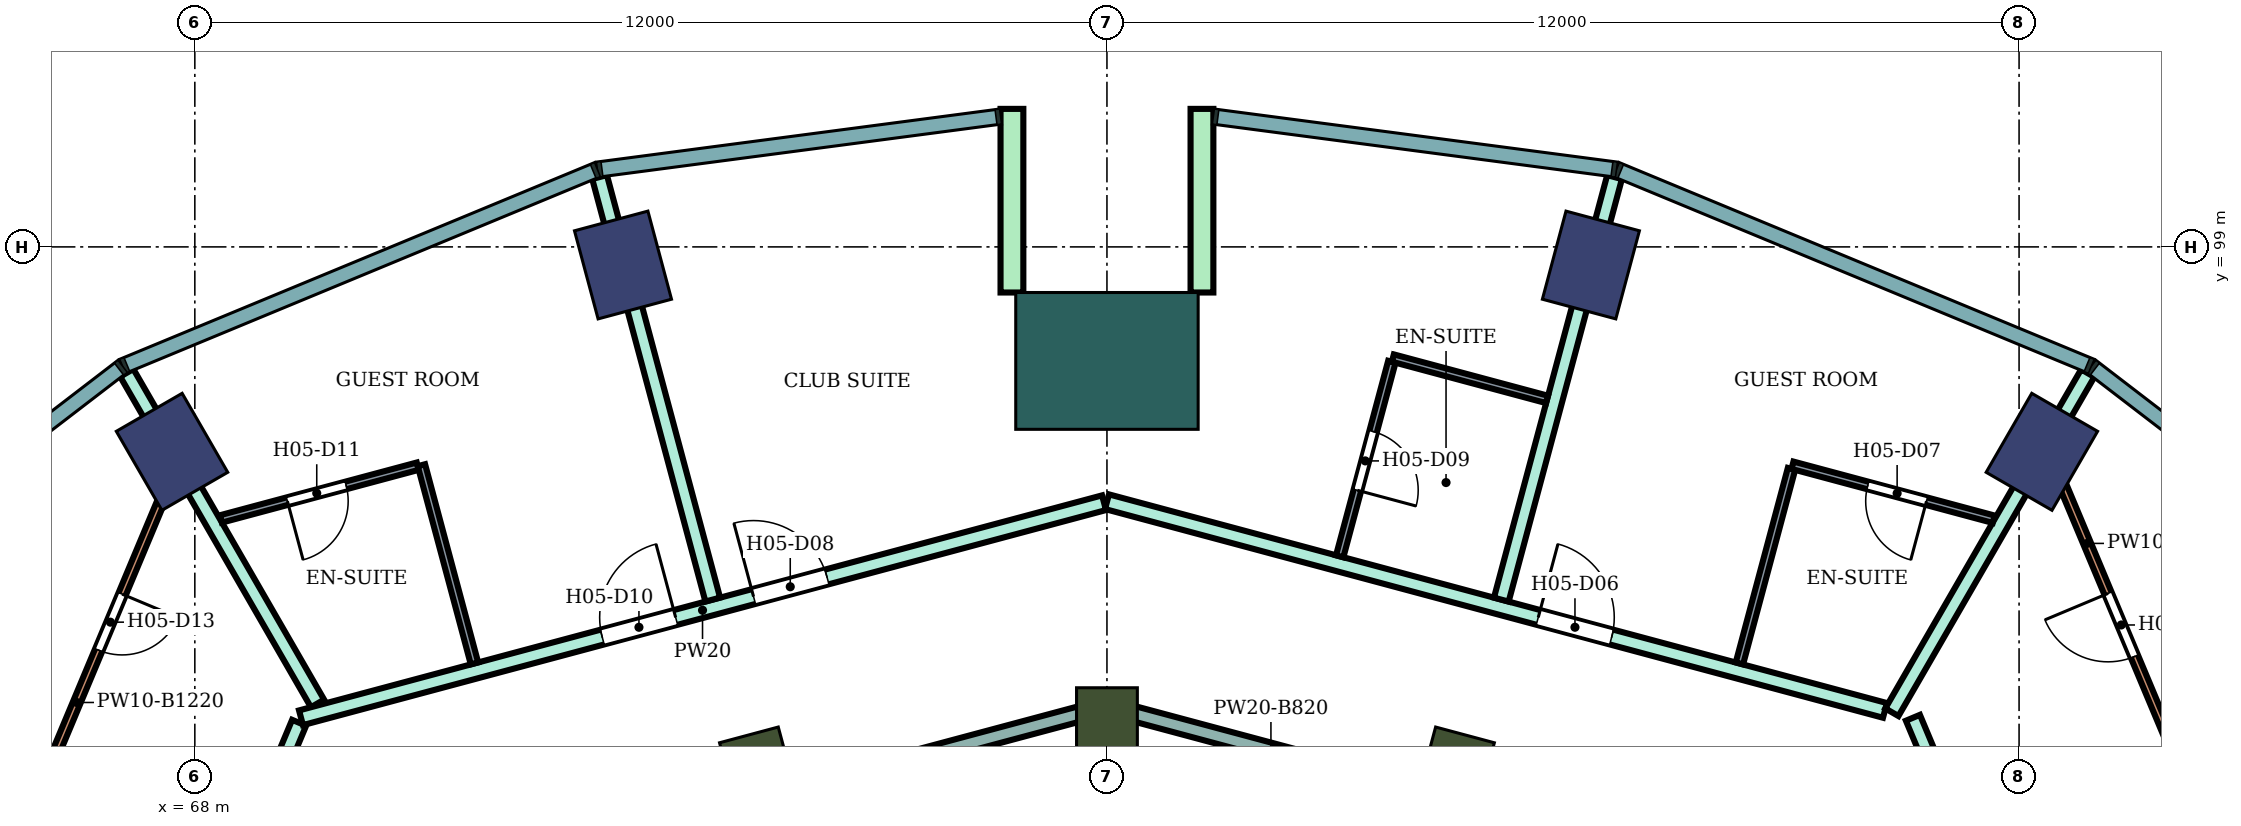
"""IFC4 building model, lengths in metres.
Left out: names, types, materials, properties, quantities, classifications, styles, units other than length and angle.
Written with IfcOpenShell. Run it as: python <this file> out.ifc"""

import sys

from ifc_helpers import new_model, si_unit, direction, frame, frame_2d, origin, origin_2d, place, context, subcontext, project, spatial, rectangle, extrude, element, fill, save


model = new_model("IFC4")
c1 = context("Model", 3, precision=1e-05, world=origin(), true_north=direction((0.0, 1.0)))
c2 = subcontext(c1, "Body", "Model", "MODEL_VIEW")
j1 = project(units=[si_unit("LENGTHUNIT", "METRE"), si_unit("PLANEANGLEUNIT", "RADIAN")], contexts=[c1])
p1 = place(None, origin())
s1 = spatial("IfcSite", under=j1, at=p1, CompositionType="ELEMENT")
p2 = place(p1, origin())
s2 = spatial("IfcBuilding", under=s1, at=p2, CompositionType="ELEMENT")
p3 = place(p2, frame((0.0, 0.0, 90.0)))
s3 = spatial("IfcBuildingStorey", under=s2, at=p3, CompositionType="ELEMENT", Elevation=90.0)
for number, where, z_axis, x_axis in (
    (1, (92.3, 96.304, 0.0), (0.0, 0.0, 1.0), (0.5, 0.866, 0.0)),
    (2, (86.367, 98.762, 0.0), (0.0, 0.0, 1.0), (0.259, 0.966, 0.0)),
    (3, (73.633, 98.762, 0.0), (0.0, 0.0, 1.0), (-0.259, 0.966, 0.0)),
    (4, (67.7, 96.304, 0.0), (0.0, 0.0, 1.0), (-0.5, 0.866, 0.0)),
):
    element("IfcColumn", number, at=place(p3, frame(where, z_axis=z_axis, x_axis=x_axis)), inside=s3, PredefinedType="COLUMN", context=c2, shape_type="SweptSolid", body=[
        extrude(rectangle(XDim=1.2, YDim=1.0, at=origin_2d()), origin(), (0.0, 0.0, 1.0), 3.8),
    ])
for number, where, z_axis, x_axis in (
    (5, (84.555, 92.0, 0.0), (0.0, 0.0, 1.0), (0.259, 0.966, 0.0)),
    (6, (80.0, 92.6, 0.0), (0.0, 0.0, 1.0), (0.0, 1.0, 0.0)),
    (7, (75.445, 92.0, 0.0), (0.0, 0.0, 1.0), (-0.259, 0.966, 0.0)),
):
    element("IfcColumn", number, at=place(p3, frame(where, z_axis=z_axis, x_axis=x_axis)), inside=s3, PredefinedType="COLUMN", context=c2, shape_type="SweptSolid", body=[
        extrude(rectangle(XDim=1.2, YDim=0.8, at=origin_2d()), origin(), (0.0, 0.0, 1.0), 3.8),
    ])
p4 = place(p3, frame((80.0, 97.5, 0.0), z_axis=(0.0, 0.0, 1.0), x_axis=(0.0, 1.0, 0.0)))
e8 = element("IfcColumn", 8, at=p4, inside=s3, PredefinedType="COLUMN", context=c2, shape_type="SweptSolid", body=[
    extrude(rectangle(XDim=1.8, YDim=2.4, at=origin_2d()), origin(), (0.0, 0.0, 1.0), 3.8),
])
for number, where, z_axis, x_axis in (
    (9, (81.25, 98.4, 0.0), (0.0, 0.0, 1.0), (0.0, 1.0, 0.0)),
    (10, (78.75, 98.4, 0.0), (0.0, 0.0, 1.0), (0.0, 1.0, 0.0)),
):
    element("IfcWall", number, at=place(p3, frame(where, z_axis=z_axis, x_axis=x_axis)), inside=s3, PredefinedType="NOTDEFINED", context=c2, shape_type="SweptSolid", body=[
        extrude(rectangle(XDim=2.416, YDim=0.3, at=frame_2d((1.208, 0.0))), origin(), (0.0, 0.0, 1.0), 3.8),
    ])
p5 = place(p3, frame((66.085, 84.9, 0.0), z_axis=(0.0, 0.0, 1.0), x_axis=(0.386676248006, 0.922215527536, 0.0)))
e11 = element("IfcWall", 11, at=p5, inside=s3, PredefinedType="PARTITIONING", context=c2, shape_type="SweptSolid", body=[
    extrude(rectangle(XDim=8.5, YDim=0.2, at=frame_2d((4.25, 0.0))), origin(), (0.0, 0.0, 1.0), 3.35),
])
p6 = place(p5, frame((3.748, 0.0, 0.0)))
e12 = element("IfcOpeningElement", 12, at=p6, cuts=e11, PredefinedType="OPENING", context=c2, shape_type="SweptSolid", body=[
    extrude(rectangle(XDim=1.0, YDim=2.1, at=frame_2d((0.5, 1.05))), frame((0.0, 0.11, 0.0), z_axis=(0.0, -1.0, 0.0), x_axis=(1.0, 0.0, 0.0)), (0.0, 0.0, 1.0), 0.22),
])
p7 = place(p3, frame((67.104, 97.343, 0.0), z_axis=(0.0, 0.0, 1.0), x_axis=(0.499799615385, -0.866141064989, 0.0)))
e13 = element("IfcWall", 13, at=p7, inside=s3, PredefinedType="PARTITIONING", context=c2, shape_type="SweptSolid", body=[
    extrude(rectangle(XDim=5.021, YDim=0.2, at=frame_2d((2.511, 0.0))), origin(), (0.0, 0.0, 1.0), 3.35),
])
p8 = place(p3, frame((69.397, 92.805, 0.0), z_axis=(0.0, 0.0, 1.0), x_axis=(0.96596468683, 0.258673972015, 0.0)))
e14 = element("IfcWall", 14, at=p8, inside=s3, PredefinedType="PARTITIONING", context=c2, shape_type="SweptSolid", body=[
    extrude(rectangle(XDim=10.937, YDim=0.2, at=frame_2d((5.469, 0.0))), origin(), (0.0, 0.0, 1.0), 3.35),
])
p9 = place(p8, frame((6.163, 0.0, 0.0)))
e15 = element("IfcOpeningElement", 15, at=p9, cuts=e14, PredefinedType="OPENING", context=c2, shape_type="SweptSolid", body=[
    extrude(rectangle(XDim=1.0, YDim=2.1, at=frame_2d((0.5, 1.05))), frame((0.0, 0.11, 0.0), z_axis=(0.0, -1.0, 0.0), x_axis=(1.0, 0.0, 0.0)), (0.0, 0.0, 1.0), 0.22),
])
p10 = place(p8, frame((4.103, 0.0, 0.0)))
e16 = element("IfcOpeningElement", 16, at=p10, cuts=e14, PredefinedType="OPENING", context=c2, shape_type="SweptSolid", body=[
    extrude(rectangle(XDim=1.0, YDim=2.1, at=frame_2d((0.5, 1.05))), frame((0.0, 0.11, 0.0), z_axis=(0.0, -1.0, 0.0), x_axis=(1.0, 0.0, 0.0)), (0.0, 0.0, 1.0), 0.22),
])
p11 = place(p3, frame((71.303, 90.625, 0.0), z_axis=(0.0, 0.0, 1.0), x_axis=(0.965971868307, 0.258647152776, 0.0)))
e17 = element("IfcWall", 17, at=p11, inside=s3, PredefinedType="PARTITIONING", context=c2, shape_type="SweptSolid", body=[
    extrude(rectangle(XDim=8.874, YDim=0.2, at=frame_2d((4.437, 0.0))), origin(), (0.0, 0.0, 1.0), 2.98),
])
p12 = place(p11, frame((0.55, 0.0, 0.0)))
e18 = element("IfcOpeningElement", 18, at=p12, cuts=e17, PredefinedType="OPENING", context=c2, shape_type="SweptSolid", body=[
    extrude(rectangle(XDim=1.0, YDim=2.1, at=frame_2d((0.5, 1.05))), frame((0.0, 0.11, 0.0), z_axis=(0.0, -1.0, 0.0), x_axis=(1.0, 0.0, 0.0)), (0.0, 0.0, 1.0), 0.22),
])
p13 = place(p3, frame((73.325, 99.919, 0.0), z_axis=(0.0, 0.0, 1.0), x_axis=(0.25871346471, -0.965954110286, 0.0)))
e19 = element("IfcWall", 19, at=p13, inside=s3, PredefinedType="PARTITIONING", context=c2, shape_type="SweptSolid", body=[
    extrude(rectangle(XDim=5.754, YDim=0.2, at=frame_2d((2.877, 0.0))), origin(), (0.0, 0.0, 1.0), 3.35),
])
p14 = place(p3, frame((80.0, 82.699, 0.0), z_axis=(0.0, 0.0, 1.0), x_axis=(0.0, 1.0, 0.0)))
e20 = element("IfcWall", 20, at=p14, inside=s3, PredefinedType="PARTITIONING", context=c2, shape_type="SweptSolid", body=[
    extrude(rectangle(XDim=10.125, YDim=0.2, at=frame_2d((5.062, 0.0))), origin(), (0.0, 0.0, 1.0), 3.35),
])
p15 = place(p3, frame((80.0, 92.954, 0.0), z_axis=(0.0, 0.0, 1.0), x_axis=(0.965932194462, -0.258795277586, 0.0)))
e21 = element("IfcWall", 21, at=p15, inside=s3, PredefinedType="PARTITIONING", context=c2, shape_type="SweptSolid", body=[
    extrude(rectangle(XDim=8.934, YDim=0.2, at=frame_2d((4.467, 0.0))), origin(), (0.0, 0.0, 1.0), 2.98),
])
p16 = place(p15, frame((3.302, 0.0, 0.0)))
e22 = element("IfcOpeningElement", 22, at=p16, cuts=e21, PredefinedType="OPENING", context=c2, shape_type="SweptSolid", body=[
    extrude(rectangle(XDim=0.9, YDim=2.1, at=frame_2d((0.45, 1.05))), frame((0.0, 0.11, 0.0), z_axis=(0.0, -1.0, 0.0), x_axis=(1.0, 0.0, 0.0)), (0.0, 0.0, 1.0), 0.22),
])
p17 = place(p3, frame((80.0, 95.648, 0.0), z_axis=(0.0, 0.0, 1.0), x_axis=(0.965852259202, -0.259093445292, 0.0)))
e23 = element("IfcWall", 23, at=p17, inside=s3, PredefinedType="PARTITIONING", context=c2, shape_type="SweptSolid", body=[
    extrude(rectangle(XDim=10.597, YDim=0.2, at=frame_2d((5.298, 0.0))), origin(), (0.0, 0.0, 1.0), 3.35),
])
p18 = place(p17, frame((5.875, 0.0, 0.0)))
e24 = element("IfcOpeningElement", 24, at=p18, cuts=e23, PredefinedType="OPENING", context=c2, shape_type="SweptSolid", body=[
    extrude(rectangle(XDim=1.0, YDim=2.1, at=frame_2d((0.5, 1.05))), frame((0.0, 0.11, 0.0), z_axis=(0.0, -1.0, 0.0), x_axis=(1.0, 0.0, 0.0)), (0.0, 0.0, 1.0), 0.22),
])
p19 = place(p3, frame((85.188, 94.36, 0.0), z_axis=(0.0, 0.0, 1.0), x_axis=(0.258882407816, 0.965908846074, 0.0)))
e25 = element("IfcWall", 25, at=p19, inside=s3, PredefinedType="PARTITIONING", context=c2, shape_type="SweptSolid", body=[
    extrude(rectangle(XDim=5.755, YDim=0.2, at=frame_2d((2.877, 0.0))), origin(), (0.0, 0.0, 1.0), 3.35),
])
p20 = place(p3, frame((90.327, 92.878, 0.0), z_axis=(0.0, 0.0, 1.0), x_axis=(0.50022153717, 0.865897461453, 0.0)))
e26 = element("IfcWall", 26, at=p20, inside=s3, PredefinedType="PARTITIONING", context=c2, shape_type="SweptSolid", body=[
    extrude(rectangle(XDim=5.152, YDim=0.2, at=frame_2d((2.576, 0.0))), origin(), (0.0, 0.0, 1.0), 3.35),
])
p21 = place(p3, frame((90.604, 92.805, 0.0), z_axis=(0.0, 0.0, 1.0), x_axis=(0.386209298583, -0.922411176042, 0.0)))
e27 = element("IfcWall", 27, at=p21, inside=s3, PredefinedType="PARTITIONING", context=c2, shape_type="SweptSolid", body=[
    extrude(rectangle(XDim=8.48, YDim=0.2, at=frame_2d((4.24, 0.0))), origin(), (0.0, 0.0, 1.0), 3.35),
])
p22 = place(p21, frame((3.723, 0.0, 0.0)))
e28 = element("IfcOpeningElement", 28, at=p22, cuts=e27, PredefinedType="OPENING", context=c2, shape_type="SweptSolid", body=[
    extrude(rectangle(XDim=1.1, YDim=2.1, at=frame_2d((0.55, 1.05))), frame((0.0, 0.11, 0.0), z_axis=(0.0, -1.0, 0.0), x_axis=(1.0, 0.0, 0.0)), (0.0, 0.0, 1.0), 0.22),
])
p23 = place(p3, frame((66.023, 91.996, 0.0), z_axis=(0.0, 0.0, 1.0), x_axis=(0.386497426192, 0.922290485447, 0.0)))
e29 = element("IfcWall", 29, at=p23, inside=s3, PredefinedType="PARTITIONING", context=c2, shape_type="SweptSolid", body=[
    extrude(rectangle(XDim=4.383, YDim=0.1, at=frame_2d((2.191, 0.0))), origin(), (0.0, 0.0, 1.0), 2.58),
])
p24 = place(p23, frame((1.841, 0.0, 0.0)))
e30 = element("IfcOpeningElement", 30, at=p24, cuts=e29, PredefinedType="OPENING", context=c2, shape_type="SweptSolid", body=[
    extrude(rectangle(XDim=0.8, YDim=2.1, at=frame_2d((0.4, 1.05))), frame((0.0, 0.06, 0.0), z_axis=(0.0, -1.0, 0.0), x_axis=(1.0, 0.0, 0.0)), (0.0, 0.0, 1.0), 0.12),
])
p25 = place(p3, frame((68.343, 95.421, 0.0), z_axis=(0.0, 0.0, 1.0), x_axis=(0.965922846648, 0.258830165017, 0.0)))
e31 = element("IfcWall", 31, at=p25, inside=s3, PredefinedType="PARTITIONING", context=c2, shape_type="SweptSolid", body=[
    extrude(rectangle(XDim=2.681, YDim=0.1, at=frame_2d((1.34, 0.0))), origin(), (0.0, 0.0, 1.0), 3.35),
])
p26 = place(p25, frame((0.905, 0.0, 0.0)))
e32 = element("IfcOpeningElement", 32, at=p26, cuts=e31, PredefinedType="OPENING", context=c2, shape_type="SweptSolid", body=[
    extrude(rectangle(XDim=0.8, YDim=2.1, at=frame_2d((0.4, 1.05))), frame((0.0, 0.06, 0.0), z_axis=(0.0, -1.0, 0.0), x_axis=(1.0, 0.0, 0.0)), (0.0, 0.0, 1.0), 0.12),
])
p27 = place(p3, frame((70.981, 96.128, 0.0), z_axis=(0.0, 0.0, 1.0), x_axis=(0.25867580527, -0.965964195904, 0.0)))
e33 = element("IfcWall", 33, at=p27, inside=s3, PredefinedType="PARTITIONING", context=c2, shape_type="SweptSolid", body=[
    extrude(rectangle(XDim=2.699, YDim=0.1, at=frame_2d((1.35, 0.0))), origin(), (0.0, 0.0, 1.0), 3.35),
])
p28 = place(p3, frame((83.062, 94.929, 0.0), z_axis=(0.0, 0.0, 1.0), x_axis=(0.258889588814, 0.965906921398, 0.0)))
e34 = element("IfcWall", 34, at=p28, inside=s3, PredefinedType="PARTITIONING", context=c2, shape_type="SweptSolid", body=[
    extrude(rectangle(XDim=2.65, YDim=0.1, at=frame_2d((1.325, 0.0))), origin(), (0.0, 0.0, 1.0), 3.35),
])
p29 = place(p28, frame((0.9, 0.0, 0.0)))
e35 = element("IfcOpeningElement", 35, at=p29, cuts=e34, PredefinedType="OPENING", context=c2, shape_type="SweptSolid", body=[
    extrude(rectangle(XDim=0.8, YDim=2.1, at=frame_2d((0.4, 1.05))), frame((0.0, 0.06, 0.0), z_axis=(0.0, -1.0, 0.0), x_axis=(1.0, 0.0, 0.0)), (0.0, 0.0, 1.0), 0.12),
])
p30 = place(p3, frame((83.761, 97.538, 0.0), z_axis=(0.0, 0.0, 1.0), x_axis=(0.965871218513, -0.259022758166, 0.0)))
e36 = element("IfcWall", 36, at=p30, inside=s3, PredefinedType="PARTITIONING", context=c2, shape_type="SweptSolid", body=[
    extrude(rectangle(XDim=2.1, YDim=0.1, at=frame_2d((1.05, 0.0))), origin(), (0.0, 0.0, 1.0), 3.35),
])
p31 = place(p3, frame((88.321, 93.521, 0.0), z_axis=(0.0, 0.0, 1.0), x_axis=(0.258677737588, 0.965963678446, 0.0)))
e37 = element("IfcWall", 37, at=p31, inside=s3, PredefinedType="PARTITIONING", context=c2, shape_type="SweptSolid", body=[
    extrude(rectangle(XDim=2.649, YDim=0.1, at=frame_2d((1.325, 0.0))), origin(), (0.0, 0.0, 1.0), 3.35),
])
p32 = place(p3, frame((89.019, 96.127, 0.0), z_axis=(0.0, 0.0, 1.0), x_axis=(0.965839030583, -0.259142754101, 0.0)))
e38 = element("IfcWall", 38, at=p32, inside=s3, PredefinedType="PARTITIONING", context=c2, shape_type="SweptSolid", body=[
    extrude(rectangle(XDim=2.74, YDim=0.1, at=frame_2d((1.37, 0.0))), origin(), (0.0, 0.0, 1.0), 3.35),
])
p33 = place(p32, frame((1.026, 0.0, 0.0)))
e39 = element("IfcOpeningElement", 39, at=p33, cuts=e38, PredefinedType="OPENING", context=c2, shape_type="SweptSolid", body=[
    extrude(rectangle(XDim=0.8, YDim=2.1, at=frame_2d((0.4, 1.05))), frame((0.0, 0.06, 0.0), z_axis=(0.0, -1.0, 0.0), x_axis=(1.0, 0.0, 0.0)), (0.0, 0.0, 1.0), 0.12),
])
p34 = place(p3, frame((92.414, 96.246, 0.0), z_axis=(0.0, 0.0, 1.0), x_axis=(0.386353683992, -0.922350709256, 0.0)))
e40 = element("IfcWall", 40, at=p34, inside=s3, PredefinedType="PARTITIONING", context=c2, shape_type="SweptSolid", body=[
    extrude(rectangle(XDim=4.974, YDim=0.1, at=frame_2d((2.487, 0.0))), origin(), (0.0, 0.0, 1.0), 2.58),
])
p35 = place(p34, frame((1.957, 0.0, 0.0)))
e41 = element("IfcOpeningElement", 41, at=p35, cuts=e40, PredefinedType="OPENING", context=c2, shape_type="SweptSolid", body=[
    extrude(rectangle(XDim=0.9, YDim=2.1, at=frame_2d((0.45, 1.05))), frame((0.0, 0.06, 0.0), z_axis=(0.0, -1.0, 0.0), x_axis=(1.0, 0.0, 0.0)), (0.0, 0.0, 1.0), 0.12),
])
p36 = place(p35, frame((0.9, 0.0, 0.0), z_axis=(0.0, 0.0, 1.0), x_axis=(-1.0, 0.0, 0.0)))
e42 = element("IfcDoor", 42, at=p36, inside=s3, OperationType="SINGLE_SWING_RIGHT", PredefinedType="DOOR", context=c2, shape_type="SweptSolid", body=[
    extrude(rectangle(XDim=0.9, YDim=2.1, at=frame_2d((0.45, 1.05))), frame((0.0, 0.025, 0.0), z_axis=(0.0, -1.0, 0.0), x_axis=(1.0, 0.0, 0.0)), (0.0, 0.0, 1.0), 0.05),
])
fill(e41, e42)
p37 = place(p18, origin())
e43 = element("IfcDoor", 43, at=p37, inside=s3, OperationType="SINGLE_SWING_LEFT", PredefinedType="DOOR", context=c2, shape_type="SweptSolid", body=[
    extrude(rectangle(XDim=1.0, YDim=2.1, at=frame_2d((0.5, 1.05))), frame((0.0, 0.025, 0.0), z_axis=(0.0, -1.0, 0.0), x_axis=(1.0, 0.0, 0.0)), (0.0, 0.0, 1.0), 0.05),
])
fill(e24, e43)
p38 = place(p33, frame((0.8, 0.0, 0.0), z_axis=(0.0, 0.0, 1.0), x_axis=(-1.0, 0.0, 0.0)))
e44 = element("IfcDoor", 44, at=p38, inside=s3, OperationType="SINGLE_SWING_LEFT", PredefinedType="DOOR", context=c2, shape_type="SweptSolid", body=[
    extrude(rectangle(XDim=0.8, YDim=2.1, at=frame_2d((0.4, 1.05))), frame((0.0, 0.025, 0.0), z_axis=(0.0, -1.0, 0.0), x_axis=(1.0, 0.0, 0.0)), (0.0, 0.0, 1.0), 0.05),
])
fill(e39, e44)
p39 = place(p9, origin())
e45 = element("IfcDoor", 45, at=p39, inside=s3, OperationType="SINGLE_SWING_LEFT", PredefinedType="DOOR", context=c2, shape_type="SweptSolid", body=[
    extrude(rectangle(XDim=1.0, YDim=2.1, at=frame_2d((0.5, 1.05))), frame((0.0, 0.025, 0.0), z_axis=(0.0, -1.0, 0.0), x_axis=(1.0, 0.0, 0.0)), (0.0, 0.0, 1.0), 0.05),
])
fill(e15, e45)
p40 = place(p29, frame((0.8, 0.0, 0.0), z_axis=(0.0, 0.0, 1.0), x_axis=(-1.0, 0.0, 0.0)))
e46 = element("IfcDoor", 46, at=p40, inside=s3, OperationType="SINGLE_SWING_RIGHT", PredefinedType="DOOR", context=c2, shape_type="SweptSolid", body=[
    extrude(rectangle(XDim=0.8, YDim=2.1, at=frame_2d((0.4, 1.05))), frame((0.0, 0.025, 0.0), z_axis=(0.0, -1.0, 0.0), x_axis=(1.0, 0.0, 0.0)), (0.0, 0.0, 1.0), 0.05),
])
fill(e35, e46)
p41 = place(p10, origin())
e47 = element("IfcDoor", 47, at=p41, inside=s3, OperationType="SINGLE_SWING_RIGHT", PredefinedType="DOOR", context=c2, shape_type="SweptSolid", body=[
    extrude(rectangle(XDim=1.0, YDim=2.1, at=frame_2d((0.5, 1.05))), frame((0.0, 0.025, 0.0), z_axis=(0.0, -1.0, 0.0), x_axis=(1.0, 0.0, 0.0)), (0.0, 0.0, 1.0), 0.05),
])
fill(e16, e47)
p42 = place(p26, frame((0.8, 0.0, 0.0), z_axis=(0.0, 0.0, 1.0), x_axis=(-1.0, 0.0, 0.0)))
e48 = element("IfcDoor", 48, at=p42, inside=s3, OperationType="SINGLE_SWING_RIGHT", PredefinedType="DOOR", context=c2, shape_type="SweptSolid", body=[
    extrude(rectangle(XDim=0.8, YDim=2.1, at=frame_2d((0.4, 1.05))), frame((0.0, 0.025, 0.0), z_axis=(0.0, -1.0, 0.0), x_axis=(1.0, 0.0, 0.0)), (0.0, 0.0, 1.0), 0.05),
])
fill(e32, e48)
p43 = place(p24, frame((0.8, 0.0, 0.0), z_axis=(0.0, 0.0, 1.0), x_axis=(-1.0, 0.0, 0.0)))
e49 = element("IfcDoor", 49, at=p43, inside=s3, OperationType="SINGLE_SWING_LEFT", PredefinedType="DOOR", context=c2, shape_type="SweptSolid", body=[
    extrude(rectangle(XDim=0.8, YDim=2.1, at=frame_2d((0.4, 1.05))), frame((0.0, 0.025, 0.0), z_axis=(0.0, -1.0, 0.0), x_axis=(1.0, 0.0, 0.0)), (0.0, 0.0, 1.0), 0.05),
])
fill(e30, e49)
save(model, sys.argv[1])
